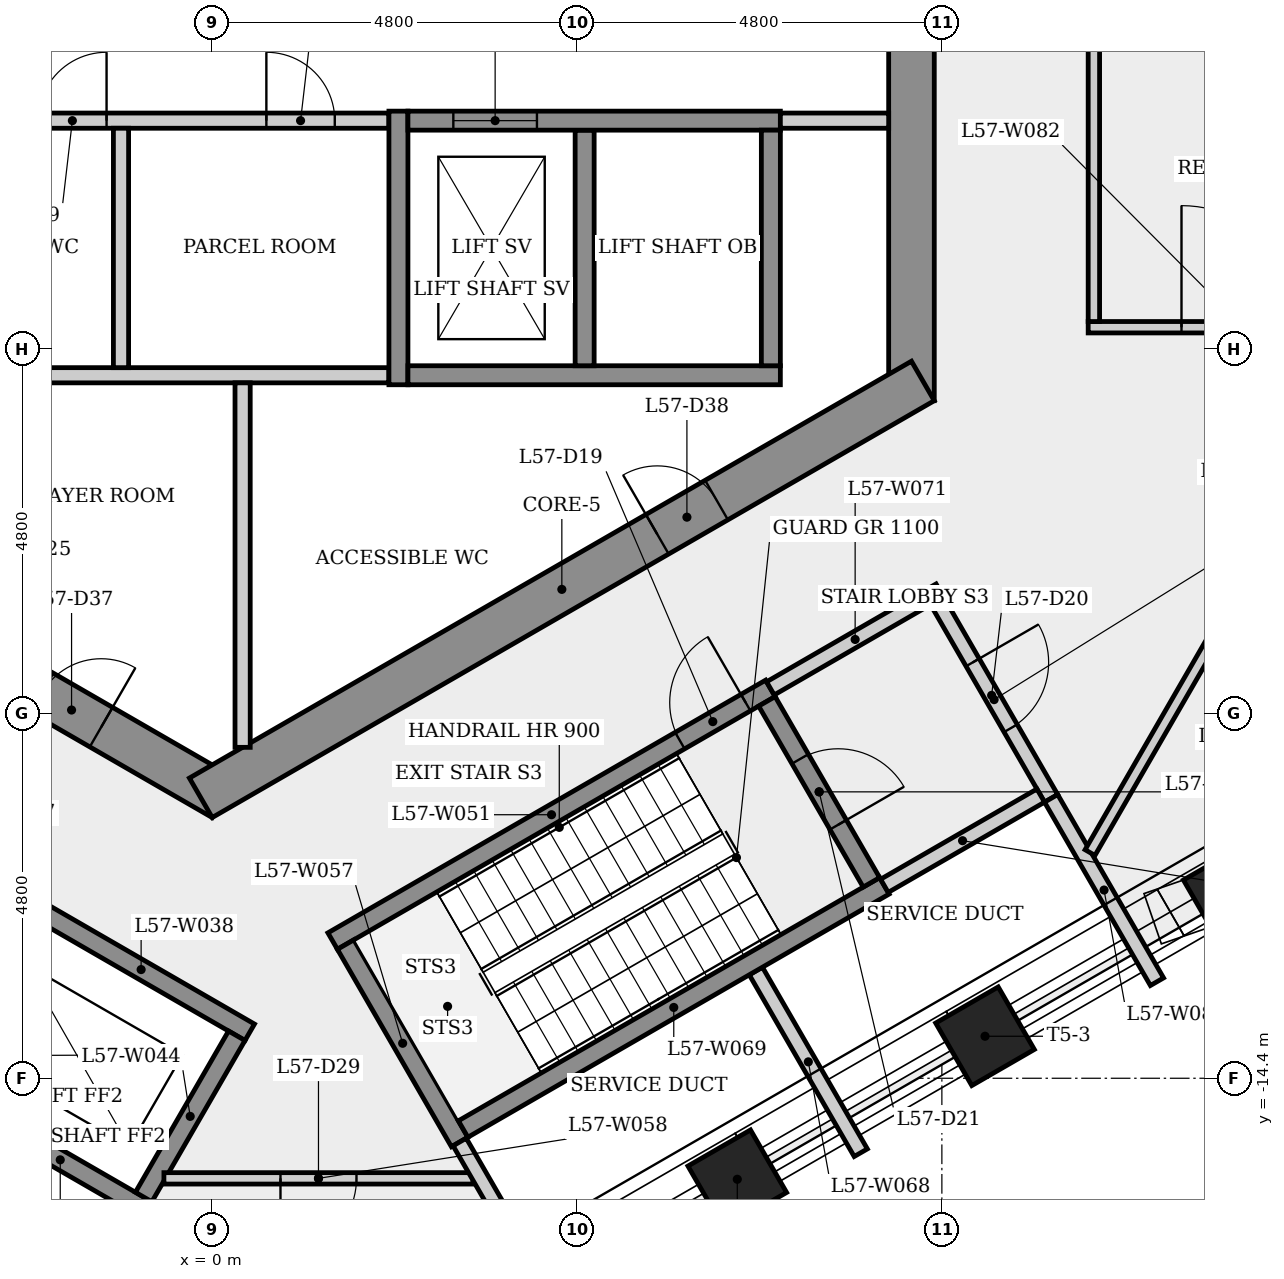
"""IFC4 building model, lengths in metres.
Left out: names, types, materials, properties, quantities, classifications, styles, units other than length and angle.
Written with IfcOpenShell. Run it as: python <this file> out.ifc"""

import sys

from ifc_helpers import new_model, si_unit, direction, frame, frame_2d, origin, origin_2d, place, context, subcontext, project, spatial, rectangle, extrude, element, fill, save


model = new_model("IFC4")
c1 = context("Model", 3, precision=1e-05, world=origin(), true_north=direction((0.0, 1.0)))
c2 = subcontext(c1, "Body", "Model", "MODEL_VIEW")
j1 = project(units=[si_unit("LENGTHUNIT", "METRE"), si_unit("PLANEANGLEUNIT", "RADIAN")], contexts=[c1])
p1 = place(None, origin())
s1 = spatial("IfcSite", under=j1, at=p1, CompositionType="ELEMENT")
p2 = place(p1, origin())
s2 = spatial("IfcBuilding", under=s1, at=p2, CompositionType="ELEMENT")
p3 = place(p2, frame((0.0, 0.0, 214.1)))
s3 = spatial("IfcBuildingStorey", under=s2, at=p3, CompositionType="ELEMENT", Elevation=214.1)
p4 = place(p3, frame((9.2, -5.485, 0.0), z_axis=(0.0, 0.0, 1.0), x_axis=(0.0, 1.0, 0.0)))
e1 = element("IfcWall", 1, at=p4, inside=s3, PredefinedType="SHEAR", context=c2, shape_type="SweptSolid", body=[
    extrude(rectangle(XDim=10.97, YDim=0.6, at=frame_2d((5.485, 0.0))), origin(), (0.0, 0.0, 1.0), 4.8),
])
p5 = place(p4, frame((4.685, 0.0, 0.0)))
e2 = element("IfcOpeningElement", 2, at=p5, cuts=e1, PredefinedType="OPENING", context=c2, shape_type="SweptSolid", body=[
    extrude(rectangle(XDim=1.6, YDim=2.1, at=frame_2d((0.8, 1.05))), frame((0.0, 0.31, 0.0), z_axis=(0.0, -1.0, 0.0), x_axis=(1.0, 0.0, 0.0)), (0.0, 0.0, 1.0), 0.62),
])
p6 = place(p3, frame((-9.35, -5.225, 0.0), z_axis=(0.0, 0.0, 1.0), x_axis=(0.866023993627, -0.500002442456, 0.0)))
e3 = element("IfcWall", 3, at=p6, inside=s3, PredefinedType="SHEAR", context=c2, shape_type="SweptSolid", body=[
    extrude(rectangle(XDim=10.97, YDim=0.6, at=frame_2d((5.485, 0.0))), origin(), (0.0, 0.0, 1.0), 4.8),
])
p7 = place(p6, frame((3.084, 0.0, 0.0)))
e4 = element("IfcOpeningElement", 4, at=p7, cuts=e3, PredefinedType="OPENING", context=c2, shape_type="SweptSolid", body=[
    extrude(rectangle(XDim=0.9, YDim=2.1, at=frame_2d((0.45, 1.05))), frame((0.0, 0.31, 0.0), z_axis=(0.0, -1.0, 0.0), x_axis=(1.0, 0.0, 0.0)), (0.0, 0.0, 1.0), 0.62),
])
p8 = place(p6, frame((8.21, 0.0, 0.0)))
e5 = element("IfcOpeningElement", 5, at=p8, cuts=e3, PredefinedType="OPENING", context=c2, shape_type="SweptSolid", body=[
    extrude(rectangle(XDim=0.9, YDim=2.1, at=frame_2d((0.45, 1.05))), frame((0.0, 0.31, 0.0), z_axis=(0.0, -1.0, 0.0), x_axis=(1.0, 0.0, 0.0)), (0.0, 0.0, 1.0), 0.62),
])
p9 = place(p3, frame((-0.15, -10.71, 0.0), z_axis=(0.0, 0.0, 1.0), x_axis=(0.866023993627, 0.500002442456, 0.0)))
e6 = element("IfcWall", 6, at=p9, inside=s3, PredefinedType="SHEAR", context=c2, shape_type="SweptSolid", body=[
    extrude(rectangle(XDim=10.97, YDim=0.6, at=frame_2d((5.485, 0.0))), origin(), (0.0, 0.0, 1.0), 4.8),
])
p10 = place(p9, frame((6.935, 0.0, 0.0)))
e7 = element("IfcOpeningElement", 7, at=p10, cuts=e6, PredefinedType="OPENING", context=c2, shape_type="SweptSolid", body=[
    extrude(rectangle(XDim=0.9, YDim=2.1, at=frame_2d((0.45, 1.05))), frame((0.0, 0.31, 0.0), z_axis=(0.0, -1.0, 0.0), x_axis=(1.0, 0.0, 0.0)), (0.0, 0.0, 1.0), 0.62),
])
for number, where, z_axis, x_axis in (
    (8, (6.908, -15.729, 0.0), (0.0, 0.0, 1.0), (0.5, -0.866, 0.0)),
    (9, (10.168, -13.847, 0.0), (0.0, 0.0, 1.0), (0.5, -0.866, 0.0)),
    (10, (13.427, -11.966, 0.0), (0.0, 0.0, 1.0), (0.5, -0.866, 0.0)),
):
    element("IfcColumn", number, at=place(p3, frame(where, z_axis=z_axis, x_axis=x_axis)), inside=s3, PredefinedType="COLUMN", context=c2, shape_type="SweptSolid", body=[
        extrude(rectangle(XDim=0.95, YDim=0.95, at=origin_2d()), origin(), (0.0, 0.0, 1.0), 4.45),
    ])
p11 = place(p3, frame((-8.88, -5.15, 0.0), z_axis=(0.0, 0.0, 1.0), x_axis=(1.0, 0.0, 0.0)))
e11 = element("IfcWall", 11, at=p11, inside=s3, PredefinedType="PARTITIONING", context=c2, shape_type="SweptSolid", body=[
    extrude(rectangle(XDim=11.205, YDim=0.2, at=frame_2d((5.603, 0.0))), origin(), (0.0, 0.0, 1.0), 4.45),
])
p12 = place(p3, frame((-8.9, -1.8, 0.0), z_axis=(0.0, 0.0, 1.0), x_axis=(1.0, 0.0, 0.0)))
e12 = element("IfcWall", 12, at=p12, inside=s3, PredefinedType="PARTITIONING", context=c2, shape_type="SweptSolid", body=[
    extrude(rectangle(XDim=11.225, YDim=0.2, at=frame_2d((5.613, 0.0))), origin(), (0.0, 0.0, 1.0), 4.45),
])
p13 = place(p12, frame((2.135, 0.0, 0.0)))
e13 = element("IfcOpeningElement", 13, at=p13, cuts=e12, PredefinedType="OPENING", context=c2, shape_type="SweptSolid", body=[
    extrude(rectangle(XDim=0.9, YDim=2.1, at=frame_2d((0.45, 1.05))), frame((0.0, 0.11, 0.0), z_axis=(0.0, -1.0, 0.0), x_axis=(1.0, 0.0, 0.0)), (0.0, 0.0, 1.0), 0.22),
])
p14 = place(p12, frame((6.61, 0.0, 0.0)))
e14 = element("IfcOpeningElement", 14, at=p14, cuts=e12, PredefinedType="OPENING", context=c2, shape_type="SweptSolid", body=[
    extrude(rectangle(XDim=0.9, YDim=2.1, at=frame_2d((0.45, 1.05))), frame((0.0, 0.11, 0.0), z_axis=(0.0, -1.0, 0.0), x_axis=(1.0, 0.0, 0.0)), (0.0, 0.0, 1.0), 0.22),
])
p15 = place(p12, frame((9.613, 0.0, 0.0)))
e15 = element("IfcOpeningElement", 15, at=p15, cuts=e12, PredefinedType="OPENING", context=c2, shape_type="SweptSolid", body=[
    extrude(rectangle(XDim=0.9, YDim=2.1, at=frame_2d((0.45, 1.05))), frame((0.0, 0.11, 0.0), z_axis=(0.0, -1.0, 0.0), x_axis=(1.0, 0.0, 0.0)), (0.0, 0.0, 1.0), 0.22),
])
p16 = place(p3, frame((-2.364, -12.145, 0.0), z_axis=(0.0, 0.0, 1.0), x_axis=(0.866040211805, -0.499974350878, 0.0)))
e16 = element("IfcWall", 16, at=p16, inside=s3, PredefinedType="SHEAR", context=c2, shape_type="SweptSolid", body=[
    extrude(rectangle(XDim=3.3, YDim=0.25, at=frame_2d((1.65, 0.0))), origin(), (0.0, 0.0, 1.0), 4.45),
])
p17 = place(p3, frame((-1.2, -1.9, 0.0), z_axis=(0.0, 0.0, 1.0), x_axis=(0.0, -1.0, 0.0)))
e17 = element("IfcWall", 17, at=p17, inside=s3, PredefinedType="PARTITIONING", context=c2, shape_type="SweptSolid", body=[
    extrude(rectangle(XDim=3.15, YDim=0.2, at=frame_2d((1.575, 0.0))), origin(), (0.0, 0.0, 1.0), 4.45),
])
p18 = place(p3, frame((-0.856, -16.133, 0.0), z_axis=(0.0, 0.0, 1.0), x_axis=(-0.866021716278, 0.500006386895, 0.0)))
e18 = element("IfcWall", 18, at=p18, inside=s3, PredefinedType="SHEAR", context=c2, shape_type="SweptSolid", body=[
    extrude(rectangle(XDim=3.3, YDim=0.25, at=frame_2d((1.65, 0.0))), origin(), (0.0, 0.0, 1.0), 4.45),
])
p19 = place(p3, frame((-0.902, -15.962, 0.0), z_axis=(0.0, 0.0, 1.0), x_axis=(0.500061746146, 0.865989751695, 0.0)))
e19 = element("IfcWall", 19, at=p19, inside=s3, PredefinedType="SHEAR", context=c2, shape_type="SweptSolid", body=[
    extrude(rectangle(XDim=2.45, YDim=0.25, at=frame_2d((1.225, 0.0))), origin(), (0.0, 0.0, 1.0), 4.8),
])
p20 = place(p3, frame((0.4, -5.25, 0.0), z_axis=(0.0, 0.0, 1.0), x_axis=(0.0, -1.0, 0.0)))
e20 = element("IfcWall", 20, at=p20, inside=s3, PredefinedType="PARTITIONING", context=c2, shape_type="SweptSolid", body=[
    extrude(rectangle(XDim=4.796, YDim=0.2, at=frame_2d((2.398, 0.0))), origin(), (0.0, 0.0, 1.0), 4.45),
])
p21 = place(p3, frame((1.585, -12.595, 0.0), z_axis=(0.0, 0.0, 1.0), x_axis=(0.866036417653, 0.499980922934, 0.0)))
e21 = element("IfcWall", 21, at=p21, inside=s3, PredefinedType="SHEAR", context=c2, shape_type="SweptSolid", body=[
    extrude(rectangle(XDim=6.65, YDim=0.25, at=frame_2d((3.325, 0.0))), origin(), (0.0, 0.0, 1.0), 4.45),
])
p22 = place(p21, frame((5.275, 0.0, 0.0)))
e22 = element("IfcOpeningElement", 22, at=p22, cuts=e21, PredefinedType="OPENING", context=c2, shape_type="SweptSolid", body=[
    extrude(rectangle(XDim=1.0, YDim=2.1, at=frame_2d((0.5, 1.05))), frame((0.0, 0.135, 0.0), z_axis=(0.0, -1.0, 0.0), x_axis=(1.0, 0.0, 0.0)), (0.0, 0.0, 1.0), 0.27),
])
p23 = place(p3, frame((2.45, -5.275, 0.0), z_axis=(0.0, 0.0, 1.0), x_axis=(0.0, 1.0, 0.0)))
e23 = element("IfcWall", 23, at=p23, inside=s3, PredefinedType="SHEAR", context=c2, shape_type="SweptSolid", body=[
    extrude(rectangle(XDim=3.6, YDim=0.25, at=frame_2d((1.8, 0.0))), origin(), (0.0, 0.0, 1.0), 4.45),
])
p24 = place(p3, frame((3.256, -15.239, 0.0), z_axis=(0.0, 0.0, 1.0), x_axis=(-0.50002537861, 0.866010750942, 0.0)))
e24 = element("IfcWall", 24, at=p24, inside=s3, PredefinedType="SHEAR", context=c2, shape_type="SweptSolid", body=[
    extrude(rectangle(XDim=3.0, YDim=0.25, at=frame_2d((1.5, 0.0))), origin(), (0.0, 0.0, 1.0), 4.45),
])
p25 = place(p3, frame((3.432, -15.717, 0.0), z_axis=(0.0, 0.0, 1.0), x_axis=(-1.0, 0.0, 0.0)))
e25 = element("IfcWall", 25, at=p25, inside=s3, PredefinedType="PARTITIONING", context=c2, shape_type="SweptSolid", body=[
    extrude(rectangle(XDim=4.067, YDim=0.15, at=frame_2d((2.034, 0.0))), origin(), (0.0, 0.0, 1.0), 4.45),
])
p26 = place(p25, frame((1.534, 0.0, 0.0)))
e26 = element("IfcOpeningElement", 26, at=p26, cuts=e25, PredefinedType="OPENING", context=c2, shape_type="SweptSolid", body=[
    extrude(rectangle(XDim=1.0, YDim=2.1, at=frame_2d((0.5, 1.05))), frame((0.0, 0.085, 0.0), z_axis=(0.0, -1.0, 0.0), x_axis=(1.0, 0.0, 0.0)), (0.0, 0.0, 1.0), 0.17),
])
p27 = place(p3, frame((3.256, -15.239, 0.0), z_axis=(0.0, 0.0, 1.0), x_axis=(0.500000584575, -0.86602506628, 0.0)))
e27 = element("IfcWall", 27, at=p27, inside=s3, PredefinedType="PLUMBINGWALL", context=c2, shape_type="SweptSolid", body=[
    extrude(rectangle(XDim=2.761, YDim=0.2, at=frame_2d((1.38, 0.0))), origin(), (0.0, 0.0, 1.0), 4.45),
])
p28 = place(p3, frame((2.575, -5.15, 0.0), z_axis=(0.0, 0.0, 1.0), x_axis=(1.0, 0.0, 0.0)))
e28 = element("IfcWall", 28, at=p28, inside=s3, PredefinedType="SHEAR", context=c2, shape_type="SweptSolid", body=[
    extrude(rectangle(XDim=4.9, YDim=0.25, at=frame_2d((2.45, 0.0))), origin(), (0.0, 0.0, 1.0), 4.45),
])
p29 = place(p3, frame((4.9, -1.925, 0.0), z_axis=(0.0, 0.0, 1.0), x_axis=(0.0, -1.0, 0.0)))
e29 = element("IfcWall", 29, at=p29, inside=s3, PredefinedType="SHEAR", context=c2, shape_type="SweptSolid", body=[
    extrude(rectangle(XDim=3.1, YDim=0.25, at=frame_2d((1.55, 0.0))), origin(), (0.0, 0.0, 1.0), 4.8),
])
p30 = place(p3, frame((2.575, -1.8, 0.0), z_axis=(0.0, 0.0, 1.0), x_axis=(1.0, 0.0, 0.0)))
e30 = element("IfcWall", 30, at=p30, inside=s3, PredefinedType="SHEAR", context=c2, shape_type="SweptSolid", body=[
    extrude(rectangle(XDim=4.9, YDim=0.25, at=frame_2d((2.45, 0.0))), origin(), (0.0, 0.0, 1.0), 4.45),
])
p31 = place(p30, frame((0.597, 0.0, 0.0)))
e31 = element("IfcOpeningElement", 31, at=p31, cuts=e30, PredefinedType="OPENING", context=c2, shape_type="SweptSolid", body=[
    extrude(rectangle(XDim=1.1, YDim=2.1, at=frame_2d((0.55, 1.05))), frame((0.0, 0.135, 0.0), z_axis=(0.0, -1.0, 0.0), x_axis=(1.0, 0.0, 0.0)), (0.0, 0.0, 1.0), 0.27),
])
p32 = place(p3, frame((7.153, -12.989, 0.0), z_axis=(0.0, 0.0, 1.0), x_axis=(0.500066904928, -0.86598677276, 0.0)))
e32 = element("IfcWall", 32, at=p32, inside=s3, PredefinedType="PLUMBINGWALL", context=c2, shape_type="SweptSolid", body=[
    extrude(rectangle(XDim=2.761, YDim=0.2, at=frame_2d((1.38, 0.0))), origin(), (0.0, 0.0, 1.0), 4.45),
])
p33 = place(p3, frame((3.301, -15.068, 0.0), z_axis=(0.0, 0.0, 1.0), x_axis=(0.866035036182, 0.499983315828, 0.0)))
e33 = element("IfcWall", 33, at=p33, inside=s3, PredefinedType="SHEAR", context=c2, shape_type="SweptSolid", body=[
    extrude(rectangle(XDim=6.4, YDim=0.25, at=frame_2d((3.2, 0.0))), origin(), (0.0, 0.0, 1.0), 4.45),
])
p34 = place(p3, frame((7.298, -9.441, 0.0), z_axis=(0.0, 0.0, 1.0), x_axis=(0.500034990121, -0.866005201286, 0.0)))
e34 = element("IfcWall", 34, at=p34, inside=s3, PredefinedType="SHEAR", context=c2, shape_type="SweptSolid", body=[
    extrude(rectangle(XDim=2.75, YDim=0.25, at=frame_2d((1.375, 0.0))), origin(), (0.0, 0.0, 1.0), 4.45),
])
p35 = place(p34, frame((0.875, 0.0, 0.0)))
e35 = element("IfcOpeningElement", 35, at=p35, cuts=e34, PredefinedType="OPENING", context=c2, shape_type="SweptSolid", body=[
    extrude(rectangle(XDim=1.0, YDim=2.1, at=frame_2d((0.5, 1.05))), frame((0.0, 0.135, 0.0), z_axis=(0.0, -1.0, 0.0), x_axis=(1.0, 0.0, 0.0)), (0.0, 0.0, 1.0), 0.27),
])
p36 = place(p3, frame((7.344, -9.27, 0.0), z_axis=(0.0, 0.0, 1.0), x_axis=(0.866005588531, 0.500034319456, 0.0)))
e36 = element("IfcWall", 36, at=p36, inside=s3, PredefinedType="PARTITIONING", context=c2, shape_type="SweptSolid", body=[
    extrude(rectangle(XDim=2.575, YDim=0.2, at=frame_2d((1.288, 0.0))), origin(), (0.0, 0.0, 1.0), 4.45),
])
p37 = place(p3, frame((7.35, -1.925, 0.0), z_axis=(0.0, 0.0, 1.0), x_axis=(0.0, -1.0, 0.0)))
e37 = element("IfcWall", 37, at=p37, inside=s3, PredefinedType="SHEAR", context=c2, shape_type="SweptSolid", body=[
    extrude(rectangle(XDim=3.1, YDim=0.25, at=frame_2d((1.55, 0.0))), origin(), (0.0, 0.0, 1.0), 4.8),
])
p38 = place(p3, frame((8.9, -1.8, 0.0), z_axis=(0.0, 0.0, 1.0), x_axis=(-1.0, 0.0, 0.0)))
e38 = element("IfcWall", 38, at=p38, inside=s3, PredefinedType="PARTITIONING", context=c2, shape_type="SweptSolid", body=[
    extrude(rectangle(XDim=1.425, YDim=0.2, at=frame_2d((0.712, 0.0))), origin(), (0.0, 0.0, 1.0), 4.45),
])
p39 = place(p3, frame((9.537, -8.119, 0.0), z_axis=(0.0, 0.0, 1.0), x_axis=(0.499990139034, -0.866031096941, 0.0)))
e39 = element("IfcWall", 39, at=p39, inside=s3, PredefinedType="PARTITIONING", context=c2, shape_type="SweptSolid", body=[
    extrude(rectangle(XDim=3.0, YDim=0.2, at=frame_2d((1.5, 0.0))), origin(), (0.0, 0.0, 1.0), 4.45),
])
p40 = place(p39, frame((0.935, 0.0, 0.0)))
e40 = element("IfcOpeningElement", 40, at=p40, cuts=e39, PredefinedType="OPENING", context=c2, shape_type="SweptSolid", body=[
    extrude(rectangle(XDim=1.0, YDim=2.1, at=frame_2d((0.5, 1.05))), frame((0.0, 0.11, 0.0), z_axis=(0.0, -1.0, 0.0), x_axis=(1.0, 0.0, 0.0)), (0.0, 0.0, 1.0), 0.22),
])
p41 = place(p3, frame((11.037, -10.717, 0.0), z_axis=(0.0, 0.0, 1.0), x_axis=(0.500013277472, -0.866017737897, 0.0)))
e41 = element("IfcWall", 41, at=p41, inside=s3, PredefinedType="PLUMBINGWALL", context=c2, shape_type="SweptSolid", body=[
    extrude(rectangle(XDim=2.786, YDim=0.2, at=frame_2d((1.393, 0.0))), origin(), (0.0, 0.0, 1.0), 4.45),
])
p42 = place(p3, frame((10.901, -10.681, 0.0), z_axis=(0.0, 0.0, 1.0), x_axis=(-0.866007538022, -0.500030943131, 0.0)))
e42 = element("IfcWall", 42, at=p42, inside=s3, PredefinedType="PLUMBINGWALL", context=c2, shape_type="SweptSolid", body=[
    extrude(rectangle(XDim=2.375, YDim=0.2, at=frame_2d((1.188, 0.0))), origin(), (0.0, 0.0, 1.0), 4.45),
])
p43 = place(p3, frame((11.525, -4.518, 0.0), z_axis=(0.0, 0.0, 1.0), x_axis=(1.0, 0.0, 0.0)))
e43 = element("IfcWall", 43, at=p43, inside=s3, PredefinedType="PARTITIONING", context=c2, shape_type="SweptSolid", body=[
    extrude(rectangle(XDim=4.09, YDim=0.15, at=frame_2d((2.045, 0.0))), origin(), (0.0, 0.0, 1.0), 4.45),
])
p44 = place(p43, frame((1.228, 0.0, 0.0)))
e44 = element("IfcOpeningElement", 44, at=p44, cuts=e43, PredefinedType="OPENING", context=c2, shape_type="SweptSolid", body=[
    extrude(rectangle(XDim=1.6, YDim=2.1, at=frame_2d((0.8, 1.05))), frame((0.0, 0.085, 0.0), z_axis=(0.0, -1.0, 0.0), x_axis=(1.0, 0.0, 0.0)), (0.0, 0.0, 1.0), 0.17),
])
p45 = place(p3, frame((11.6, -4.443, 0.0), z_axis=(0.0, 0.0, 1.0), x_axis=(0.0, 1.0, 0.0)))
e45 = element("IfcWall", 45, at=p45, inside=s3, PredefinedType="PARTITIONING", context=c2, shape_type="SweptSolid", body=[
    extrude(rectangle(XDim=8.586, YDim=0.15, at=frame_2d((4.293, 0.0))), origin(), (0.0, 0.0, 1.0), 4.45),
])
p46 = place(p45, frame((6.745, 0.0, 0.0)))
e46 = element("IfcOpeningElement", 46, at=p46, cuts=e45, PredefinedType="OPENING", context=c2, shape_type="SweptSolid", body=[
    extrude(rectangle(XDim=1.0, YDim=2.1, at=frame_2d((0.5, 1.05))), frame((0.0, 0.085, 0.0), z_axis=(0.0, -1.0, 0.0), x_axis=(1.0, 0.0, 0.0)), (0.0, 0.0, 1.0), 0.17),
])
p47 = place(p3, frame((15.502, -4.583, 0.0), z_axis=(0.0, 0.0, 1.0), x_axis=(-0.499991531824, -0.866030292833, 0.0)))
e47 = element("IfcWall", 47, at=p47, inside=s3, PredefinedType="PARTITIONING", context=c2, shape_type="SweptSolid", body=[
    extrude(rectangle(XDim=7.906, YDim=0.15, at=frame_2d((3.953, 0.0))), origin(), (0.0, 0.0, 1.0), 4.45),
])
p48 = place(p47, frame((3.403, 0.0, 0.0)))
e48 = element("IfcOpeningElement", 48, at=p48, cuts=e47, PredefinedType="OPENING", context=c2, shape_type="SweptSolid", body=[
    extrude(rectangle(XDim=1.1, YDim=2.1, at=frame_2d((0.55, 1.05))), frame((0.0, 0.085, 0.0), z_axis=(0.0, -1.0, 0.0), x_axis=(1.0, 0.0, 0.0)), (0.0, 0.0, 1.0), 0.17),
])
p49 = place(p31, origin())
e49 = element("IfcDoor", 49, at=p49, inside=s3, OperationType="SLIDING_TO_LEFT", PredefinedType="DOOR", context=c2, shape_type="SweptSolid", body=[
    extrude(rectangle(XDim=1.1, YDim=2.1, at=frame_2d((0.55, 1.05))), frame((0.0, 0.025, 0.0), z_axis=(0.0, -1.0, 0.0), x_axis=(1.0, 0.0, 0.0)), (0.0, 0.0, 1.0), 0.05),
])
fill(e31, e49)
p50 = place(p14, origin())
e50 = element("IfcDoor", 50, at=p50, inside=s3, OperationType="SINGLE_SWING_RIGHT", PredefinedType="DOOR", context=c2, shape_type="SweptSolid", body=[
    extrude(rectangle(XDim=0.9, YDim=2.1, at=frame_2d((0.45, 1.05))), frame((0.0, 0.025, 0.0), z_axis=(0.0, -1.0, 0.0), x_axis=(1.0, 0.0, 0.0)), (0.0, 0.0, 1.0), 0.05),
])
fill(e14, e50)
p51 = place(p15, origin())
e51 = element("IfcDoor", 51, at=p51, inside=s3, OperationType="SINGLE_SWING_LEFT", PredefinedType="DOOR", context=c2, shape_type="SweptSolid", body=[
    extrude(rectangle(XDim=0.9, YDim=2.1, at=frame_2d((0.45, 1.05))), frame((0.0, 0.025, 0.0), z_axis=(0.0, -1.0, 0.0), x_axis=(1.0, 0.0, 0.0)), (0.0, 0.0, 1.0), 0.05),
])
fill(e15, e51)
p52 = place(p22, origin())
e52 = element("IfcDoor", 52, at=p52, inside=s3, OperationType="SINGLE_SWING_RIGHT", PredefinedType="DOOR", context=c2, shape_type="SweptSolid", body=[
    extrude(rectangle(XDim=1.0, YDim=2.1, at=frame_2d((0.5, 1.05))), frame((0.0, 0.025, 0.0), z_axis=(0.0, -1.0, 0.0), x_axis=(1.0, 0.0, 0.0)), (0.0, 0.0, 1.0), 0.05),
])
fill(e22, e52)
p53 = place(p40, origin())
e53 = element("IfcDoor", 53, at=p53, inside=s3, OperationType="SINGLE_SWING_LEFT", PredefinedType="DOOR", context=c2, shape_type="SweptSolid", body=[
    extrude(rectangle(XDim=1.0, YDim=2.1, at=frame_2d((0.5, 1.05))), frame((0.0, 0.025, 0.0), z_axis=(0.0, -1.0, 0.0), x_axis=(1.0, 0.0, 0.0)), (0.0, 0.0, 1.0), 0.05),
])
fill(e40, e53)
p54 = place(p35, origin())
e54 = element("IfcDoor", 54, at=p54, inside=s3, OperationType="SINGLE_SWING_RIGHT", PredefinedType="DOOR", context=c2, shape_type="SweptSolid", body=[
    extrude(rectangle(XDim=1.0, YDim=2.1, at=frame_2d((0.5, 1.05))), frame((0.0, 0.025, 0.0), z_axis=(0.0, -1.0, 0.0), x_axis=(1.0, 0.0, 0.0)), (0.0, 0.0, 1.0), 0.05),
])
fill(e35, e54)
p55 = place(p44, origin())
e55 = element("IfcDoor", 55, at=p55, inside=s3, OperationType="SINGLE_SWING_LEFT", PredefinedType="DOOR", context=c2, shape_type="SweptSolid", body=[
    extrude(rectangle(XDim=1.6, YDim=2.1, at=frame_2d((0.8, 1.05))), frame((0.0, 0.025, 0.0), z_axis=(0.0, -1.0, 0.0), x_axis=(1.0, 0.0, 0.0)), (0.0, 0.0, 1.0), 0.05),
])
fill(e44, e55)
p56 = place(p26, origin())
e56 = element("IfcDoor", 56, at=p56, inside=s3, OperationType="SINGLE_SWING_RIGHT", PredefinedType="DOOR", context=c2, shape_type="SweptSolid", body=[
    extrude(rectangle(XDim=1.0, YDim=2.1, at=frame_2d((0.5, 1.05))), frame((0.0, 0.025, 0.0), z_axis=(0.0, -1.0, 0.0), x_axis=(1.0, 0.0, 0.0)), (0.0, 0.0, 1.0), 0.05),
])
fill(e26, e56)
p57 = place(p8, origin())
e57 = element("IfcDoor", 57, at=p57, inside=s3, OperationType="SINGLE_SWING_RIGHT", PredefinedType="DOOR", context=c2, shape_type="SweptSolid", body=[
    extrude(rectangle(XDim=0.9, YDim=2.1, at=frame_2d((0.45, 1.05))), frame((0.0, 0.025, 0.0), z_axis=(0.0, -1.0, 0.0), x_axis=(1.0, 0.0, 0.0)), (0.0, 0.0, 1.0), 0.05),
])
fill(e5, e57)
p58 = place(p10, origin())
e58 = element("IfcDoor", 58, at=p58, inside=s3, OperationType="SINGLE_SWING_LEFT", PredefinedType="DOOR", context=c2, shape_type="SweptSolid", body=[
    extrude(rectangle(XDim=0.9, YDim=2.1, at=frame_2d((0.45, 1.05))), frame((0.0, 0.025, 0.0), z_axis=(0.0, -1.0, 0.0), x_axis=(1.0, 0.0, 0.0)), (0.0, 0.0, 1.0), 0.05),
])
fill(e7, e58)
save(model, sys.argv[1])
